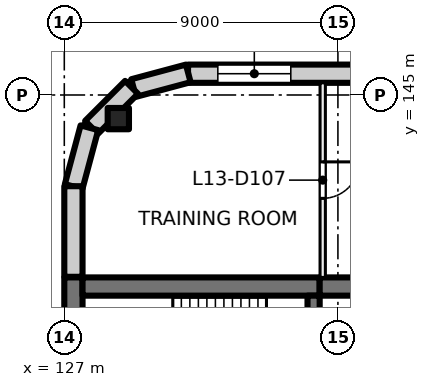
"""IFC4 building model, lengths in metres.
Left out: names, types, materials, properties, quantities, classifications, styles, units other than length and angle.
Written with IfcOpenShell. Run it as: python <this file> out.ifc"""

import sys

from ifc_helpers import new_model, si_unit, direction, frame, frame_2d, origin, origin_2d, place, context, subcontext, project, spatial, rectangle, extrude, element, fill, save


model = new_model("IFC4")
c1 = context("Model", 3, precision=1e-05, world=origin(), true_north=direction((0.0, 1.0)))
c2 = subcontext(c1, "Body", "Model", "MODEL_VIEW")
j1 = project(units=[si_unit("LENGTHUNIT", "METRE"), si_unit("PLANEANGLEUNIT", "RADIAN")], contexts=[c1])
p1 = place(None, origin())
s1 = spatial("IfcSite", under=j1, at=p1, CompositionType="ELEMENT")
p2 = place(p1, origin())
s2 = spatial("IfcBuilding", under=s1, at=p2, CompositionType="ELEMENT")
p3 = place(p2, frame((0.0, 0.0, 59.5)))
s3 = spatial("IfcBuildingStorey", under=s2, at=p3, CompositionType="ELEMENT", Elevation=59.5)
p4 = place(p3, frame((128.777, 144.223, 0.0), z_axis=(0.0, 0.0, 1.0), x_axis=(1.0, 0.0, 0.0)))
e1 = element("IfcColumn", 1, at=p4, inside=s3, PredefinedType="COLUMN", context=c2, shape_type="SweptSolid", body=[
    extrude(rectangle(XDim=0.7, YDim=0.7, at=origin_2d()), origin(), (0.0, 0.0, 1.0), 4.0),
])
p5 = place(p3, frame((127.3, 135.2, 0.0), z_axis=(0.0, 0.0, 1.0), x_axis=(0.0, 1.0, 0.0)))
e2 = element("IfcWall", 2, at=p5, inside=s3, PredefinedType="SHEAR", context=c2, shape_type="SweptSolid", body=[
    extrude(rectangle(XDim=3.8, YDim=0.6, at=frame_2d((1.9, 0.0))), origin(), (0.0, 0.0, 1.0), 4.0),
])
p6 = place(p3, frame((127.6, 138.7, 0.0), z_axis=(0.0, 0.0, 1.0), x_axis=(1.0, 0.0, 0.0)))
e3 = element("IfcWall", 3, at=p6, inside=s3, PredefinedType="SHEAR", context=c2, shape_type="SweptSolid", body=[
    extrude(rectangle(XDim=7.8, YDim=0.6, at=frame_2d((3.9, 0.0))), origin(), (0.0, 0.0, 1.0), 4.0),
])
p7 = place(p3, frame((135.4, 138.7, 0.0), z_axis=(0.0, 0.0, 1.0), x_axis=(1.0, 0.0, 0.0)))
e4 = element("IfcWall", 4, at=p7, inside=s3, PredefinedType="SHEAR", context=c2, shape_type="SweptSolid", body=[
    extrude(rectangle(XDim=4.6, YDim=0.6, at=frame_2d((2.3, 0.0))), origin(), (0.0, 0.0, 1.0), 4.0),
])
p8 = place(p3, frame((135.2, 135.6, 0.0), z_axis=(0.0, 0.0, 1.0), x_axis=(0.0, 1.0, 0.0)))
e5 = element("IfcWall", 5, at=p8, inside=s3, PredefinedType="SHEAR", context=c2, shape_type="SweptSolid", body=[
    extrude(rectangle(XDim=2.8, YDim=0.4, at=frame_2d((1.4, 0.0))), origin(), (0.0, 0.0, 1.0), 4.0),
])
p9 = place(p8, frame((0.9, 0.0, 0.0)))
e6 = element("IfcOpeningElement", 6, at=p9, cuts=e5, PredefinedType="OPENING", context=c2, shape_type="SweptSolid", body=[
    extrude(rectangle(XDim=1.0, YDim=2.1, at=frame_2d((0.5, 1.05))), frame((0.0, 0.21, 0.0), z_axis=(0.0, -1.0, 0.0), x_axis=(1.0, 0.0, 0.0)), (0.0, 0.0, 1.0), 0.42),
])
p10 = place(p3, frame((131.07, 145.7, 0.0), z_axis=(0.0, 0.0, 1.0), x_axis=(1.0, 0.0, 0.0)))
e7 = element("IfcWall", 7, at=p10, inside=s3, PredefinedType="SOLIDWALL", context=c2, shape_type="SweptSolid", body=[
    extrude(rectangle(XDim=31.93, YDim=0.6, at=frame_2d((15.965, 0.0))), origin(), (0.0, 0.0, 1.0), 3.625),
])
p11 = place(p10, frame((0.98, 0.0, 0.9)))
e8 = element("IfcOpeningElement", 8, at=p11, cuts=e7, PredefinedType="OPENING", context=c2, shape_type="SweptSolid", body=[
    extrude(rectangle(XDim=2.4, YDim=2.4, at=frame_2d((1.2, 1.2))), frame((0.0, 0.31, 0.0), z_axis=(0.0, -1.0, 0.0), x_axis=(1.0, 0.0, 0.0)), (0.0, 0.0, 1.0), 0.62),
])
p12 = place(p10, frame((5.48, 0.0, 0.9)))
e9 = element("IfcOpeningElement", 9, at=p12, cuts=e7, PredefinedType="OPENING", context=c2, shape_type="SweptSolid", body=[
    extrude(rectangle(XDim=2.4, YDim=2.4, at=frame_2d((1.2, 1.2))), frame((0.0, 0.31, 0.0), z_axis=(0.0, -1.0, 0.0), x_axis=(1.0, 0.0, 0.0)), (0.0, 0.0, 1.0), 0.62),
])
p13 = place(p10, frame((9.98, 0.0, 0.9)))
e10 = element("IfcOpeningElement", 10, at=p13, cuts=e7, PredefinedType="OPENING", context=c2, shape_type="SweptSolid", body=[
    extrude(rectangle(XDim=2.4, YDim=2.4, at=frame_2d((1.2, 1.2))), frame((0.0, 0.31, 0.0), z_axis=(0.0, -1.0, 0.0), x_axis=(1.0, 0.0, 0.0)), (0.0, 0.0, 1.0), 0.62),
])
p14 = place(p10, frame((14.48, 0.0, 0.9)))
e11 = element("IfcOpeningElement", 11, at=p14, cuts=e7, PredefinedType="OPENING", context=c2, shape_type="SweptSolid", body=[
    extrude(rectangle(XDim=2.4, YDim=2.4, at=frame_2d((1.2, 1.2))), frame((0.0, 0.31, 0.0), z_axis=(0.0, -1.0, 0.0), x_axis=(1.0, 0.0, 0.0)), (0.0, 0.0, 1.0), 0.62),
])
p15 = place(p10, frame((18.98, 0.0, 0.9)))
e12 = element("IfcOpeningElement", 12, at=p15, cuts=e7, PredefinedType="OPENING", context=c2, shape_type="SweptSolid", body=[
    extrude(rectangle(XDim=2.4, YDim=2.4, at=frame_2d((1.2, 1.2))), frame((0.0, 0.31, 0.0), z_axis=(0.0, -1.0, 0.0), x_axis=(1.0, 0.0, 0.0)), (0.0, 0.0, 1.0), 0.62),
])
p16 = place(p10, frame((23.48, 0.0, 0.9)))
e13 = element("IfcOpeningElement", 13, at=p16, cuts=e7, PredefinedType="OPENING", context=c2, shape_type="SweptSolid", body=[
    extrude(rectangle(XDim=2.4, YDim=2.4, at=frame_2d((1.2, 1.2))), frame((0.0, 0.31, 0.0), z_axis=(0.0, -1.0, 0.0), x_axis=(1.0, 0.0, 0.0)), (0.0, 0.0, 1.0), 0.62),
])
p17 = place(p10, frame((27.98, 0.0, 0.9)))
e14 = element("IfcOpeningElement", 14, at=p17, cuts=e7, PredefinedType="OPENING", context=c2, shape_type="SweptSolid", body=[
    extrude(rectangle(XDim=2.4, YDim=2.4, at=frame_2d((1.2, 1.2))), frame((0.0, 0.31, 0.0), z_axis=(0.0, -1.0, 0.0), x_axis=(1.0, 0.0, 0.0)), (0.0, 0.0, 1.0), 0.62),
])
for number, where, z_axis, x_axis in (
    (15, (129.281, 145.229, 0.0), (0.0, 0.0, 1.0), (0.966, 0.259, 0.0)),
    (16, (127.896, 143.936, 0.0), (0.0, 0.0, 1.0), (0.707, 0.707, 0.0)),
):
    element("IfcWall", number, at=place(p3, frame(where, z_axis=z_axis, x_axis=x_axis)), inside=s3, PredefinedType="SOLIDWALL", context=c2, shape_type="SweptSolid", body=[
        extrude(rectangle(XDim=1.861, YDim=0.6, at=frame_2d((0.93, 0.0))), origin(), (0.0, 0.0, 1.0), 3.625),
    ])
p18 = place(p3, frame((127.308, 141.99, 0.0), z_axis=(0.0, 0.0, 1.0), x_axis=(0.258839784042, 0.965920269068, 0.0)))
e17 = element("IfcWall", 17, at=p18, inside=s3, PredefinedType="SOLIDWALL", context=c2, shape_type="SweptSolid", body=[
    extrude(rectangle(XDim=2.0, YDim=0.6, at=frame_2d((1.0, 0.0))), origin(), (0.0, 0.0, 1.0), 3.625),
])
p19 = place(p3, frame((127.3, 139.02, 0.0), z_axis=(0.0, 0.0, 1.0), x_axis=(0.0, 1.0, 0.0)))
e18 = element("IfcWall", 18, at=p19, inside=s3, PredefinedType="SOLIDWALL", context=c2, shape_type="SweptSolid", body=[
    extrude(rectangle(XDim=2.98, YDim=0.6, at=frame_2d((1.49, 0.0))), origin(), (0.0, 0.0, 1.0), 3.625),
])
p20 = place(p3, frame((135.5, 145.4, 0.0), z_axis=(0.0, 0.0, 1.0), x_axis=(0.0, -1.0, 0.0)))
e19 = element("IfcWall", 19, at=p20, inside=s3, PredefinedType="PARTITIONING", context=c2, shape_type="SweptSolid", body=[
    extrude(rectangle(XDim=6.4, YDim=0.175, at=frame_2d((3.2, 0.0))), origin(), (0.0, 0.0, 1.0), 3.625),
])
p21 = place(p20, frame((2.6, 0.0, 0.0)))
e20 = element("IfcOpeningElement", 20, at=p21, cuts=e19, PredefinedType="OPENING", context=c2, shape_type="SweptSolid", body=[
    extrude(rectangle(XDim=1.2, YDim=2.1, at=frame_2d((0.6, 1.05))), frame((0.0, 0.097, 0.0), z_axis=(0.0, -1.0, 0.0), x_axis=(1.0, 0.0, 0.0)), (0.0, 0.0, 1.0), 0.195),
])
p22 = place(p11, origin())
e21 = element("IfcWindow", 21, at=p22, inside=s3, PartitioningType="SINGLE_PANEL", PredefinedType="WINDOW", context=c2, shape_type="SweptSolid", body=[
    extrude(rectangle(XDim=2.4, YDim=2.4, at=frame_2d((1.2, 1.2))), frame((0.0, 0.03, 0.0), z_axis=(0.0, -1.0, 0.0), x_axis=(1.0, 0.0, 0.0)), (0.0, 0.0, 1.0), 0.06),
])
fill(e8, e21)
p23 = place(p21, origin())
e22 = element("IfcDoor", 22, at=p23, inside=s3, OperationType="DOUBLE_DOOR_SINGLE_SWING", PredefinedType="DOOR", context=c2, shape_type="SweptSolid", body=[
    extrude(rectangle(XDim=1.2, YDim=2.1, at=frame_2d((0.6, 1.05))), frame((0.0, 0.025, 0.0), z_axis=(0.0, -1.0, 0.0), x_axis=(1.0, 0.0, 0.0)), (0.0, 0.0, 1.0), 0.05),
])
fill(e20, e22)
save(model, sys.argv[1])
